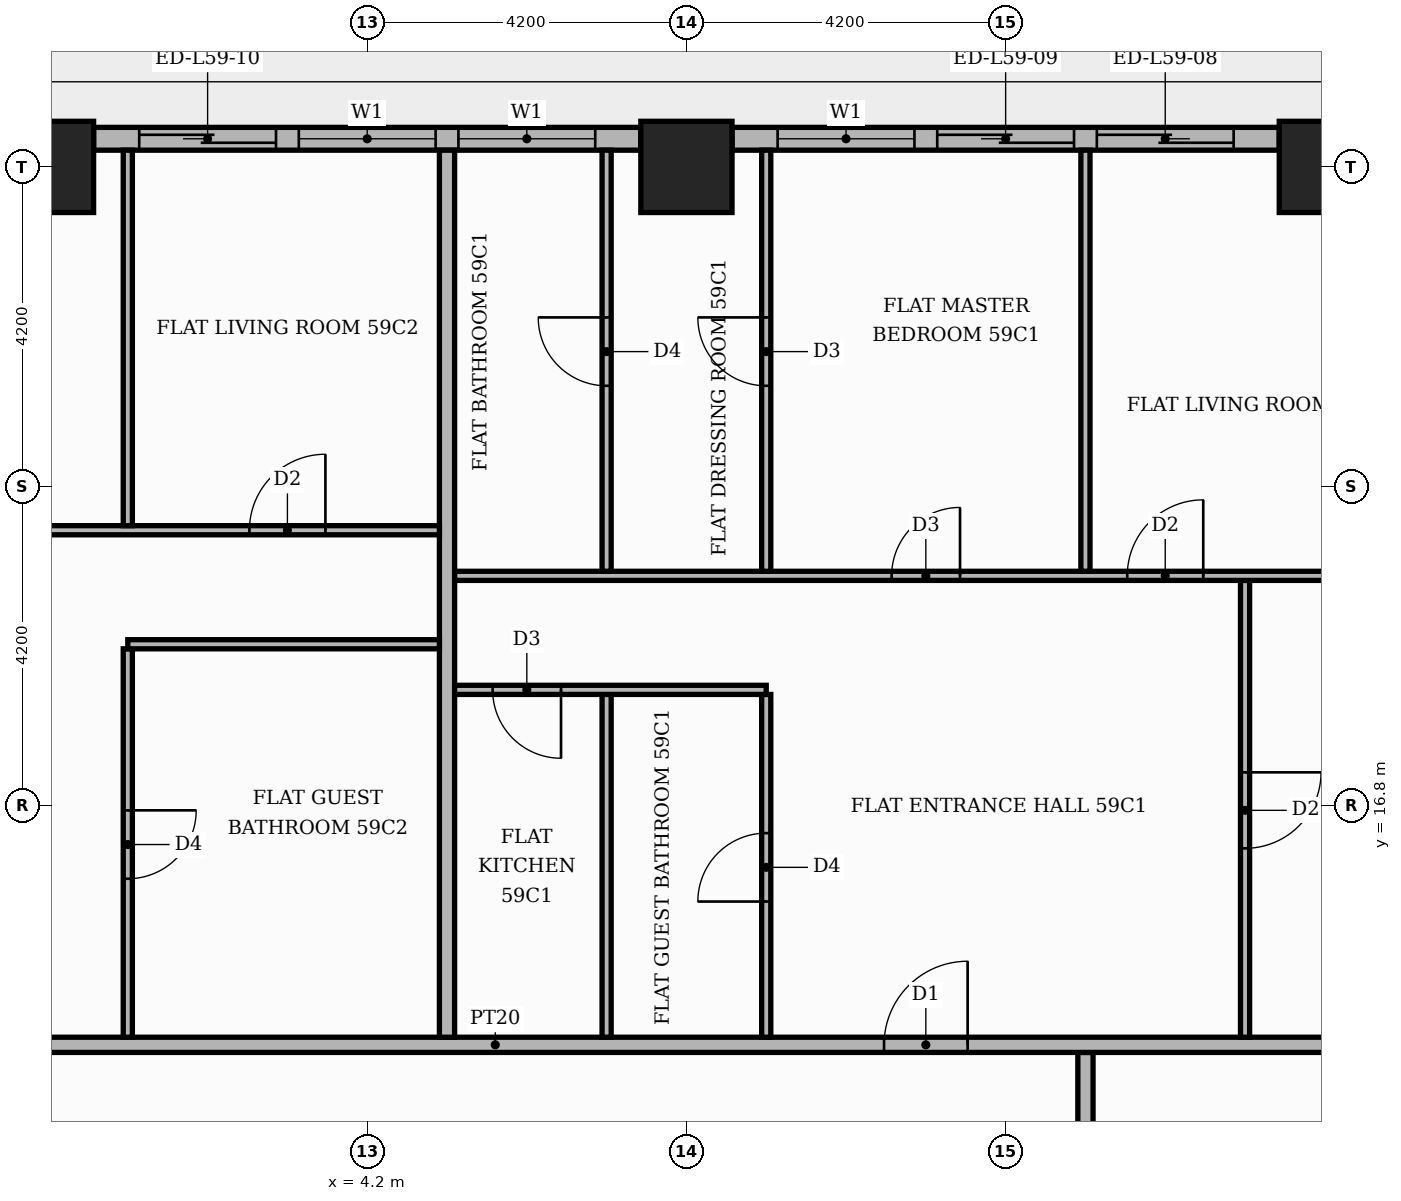
"""IFC4 building model, lengths in metres.
Left out: names, types, materials, properties, quantities, classifications, styles, units other than length and angle.
Written with IfcOpenShell. Run it as: python <this file> out.ifc"""

import sys

from ifc_helpers import new_model, si_unit, direction, frame, frame_2d, origin, origin_2d, place, context, subcontext, project, spatial, rectangle, extrude, element, fill, save


model = new_model("IFC4")
c1 = context("Model", 3, precision=1e-05, world=origin(), true_north=direction((0.0, 1.0)))
c2 = subcontext(c1, "Body", "Model", "MODEL_VIEW")
j1 = project(units=[si_unit("LENGTHUNIT", "METRE"), si_unit("PLANEANGLEUNIT", "RADIAN")], contexts=[c1])
p1 = place(None, origin())
s1 = spatial("IfcSite", under=j1, at=p1, CompositionType="ELEMENT")
p2 = place(p1, origin())
s2 = spatial("IfcBuilding", under=s1, at=p2, CompositionType="ELEMENT")
p3 = place(p2, frame((0.0, 0.0, 248.4)))
s3 = spatial("IfcBuildingStorey", under=s2, at=p3, CompositionType="ELEMENT", Elevation=248.4)
for number, where, z_axis, x_axis in (
    (1, (0.0, 25.2, 0.0), (0.0, 0.0, 1.0), (1.0, 0.0, 0.0)),
    (2, (8.4, 25.2, 0.0), (0.0, 0.0, 1.0), (1.0, 0.0, 0.0)),
    (3, (16.8, 25.2, 0.0), (0.0, 0.0, 1.0), (1.0, 0.0, 0.0)),
):
    element("IfcColumn", number, at=place(p3, frame(where, z_axis=z_axis, x_axis=x_axis)), inside=s3, PredefinedType="COLUMN", context=c2, shape_type="SweptSolid", body=[
        extrude(rectangle(XDim=1.2, YDim=1.2, at=origin_2d()), origin(), (0.0, 0.0, 1.0), 3.9),
    ])
p4 = place(p3, frame((16.2, 25.57, 0.0), z_axis=(0.0, 0.0, 1.0), x_axis=(-1.0, 0.0, 0.0)))
e4 = element("IfcWall", 4, at=p4, inside=s3, PredefinedType="STANDARD", context=c2, shape_type="SweptSolid", body=[
    extrude(rectangle(XDim=7.2, YDim=0.3, at=frame_2d((3.6, 0.0))), origin(), (0.0, 0.0, 1.0), 3.48),
])
p5 = place(p4, frame((0.6, 0.0, 0.0)))
e5 = element("IfcOpeningElement", 5, at=p5, cuts=e4, PredefinedType="OPENING", context=c2, shape_type="SweptSolid", body=[
    extrude(rectangle(XDim=1.8, YDim=2.4, at=frame_2d((0.9, 1.2))), frame((0.0, 0.16, 0.0), z_axis=(0.0, -1.0, 0.0), x_axis=(1.0, 0.0, 0.0)), (0.0, 0.0, 1.0), 0.32),
])
p6 = place(p4, frame((2.7, 0.0, 0.0)))
e6 = element("IfcOpeningElement", 6, at=p6, cuts=e4, PredefinedType="OPENING", context=c2, shape_type="SweptSolid", body=[
    extrude(rectangle(XDim=1.8, YDim=2.4, at=frame_2d((0.9, 1.2))), frame((0.0, 0.16, 0.0), z_axis=(0.0, -1.0, 0.0), x_axis=(1.0, 0.0, 0.0)), (0.0, 0.0, 1.0), 0.32),
])
p7 = place(p4, frame((4.8, 0.0, 0.9)))
e7 = element("IfcOpeningElement", 7, at=p7, cuts=e4, PredefinedType="OPENING", context=c2, shape_type="SweptSolid", body=[
    extrude(rectangle(XDim=1.8, YDim=2.1, at=frame_2d((0.9, 1.05))), frame((0.0, 0.16, 0.0), z_axis=(0.0, -1.0, 0.0), x_axis=(1.0, 0.0, 0.0)), (0.0, 0.0, 1.0), 0.32),
])
p8 = place(p3, frame((7.8, 25.57, 0.0), z_axis=(0.0, 0.0, 1.0), x_axis=(-1.0, 0.0, 0.0)))
e8 = element("IfcWall", 8, at=p8, inside=s3, PredefinedType="STANDARD", context=c2, shape_type="SweptSolid", body=[
    extrude(rectangle(XDim=7.2, YDim=0.3, at=frame_2d((3.6, 0.0))), origin(), (0.0, 0.0, 1.0), 3.48),
])
p9 = place(p8, frame((0.6, 0.0, 0.9)))
e9 = element("IfcOpeningElement", 9, at=p9, cuts=e8, PredefinedType="OPENING", context=c2, shape_type="SweptSolid", body=[
    extrude(rectangle(XDim=1.8, YDim=2.1, at=frame_2d((0.9, 1.05))), frame((0.0, 0.16, 0.0), z_axis=(0.0, -1.0, 0.0), x_axis=(1.0, 0.0, 0.0)), (0.0, 0.0, 1.0), 0.32),
])
p10 = place(p8, frame((2.7, 0.0, 0.9)))
e10 = element("IfcOpeningElement", 10, at=p10, cuts=e8, PredefinedType="OPENING", context=c2, shape_type="SweptSolid", body=[
    extrude(rectangle(XDim=1.8, YDim=2.1, at=frame_2d((0.9, 1.05))), frame((0.0, 0.16, 0.0), z_axis=(0.0, -1.0, 0.0), x_axis=(1.0, 0.0, 0.0)), (0.0, 0.0, 1.0), 0.32),
])
p11 = place(p8, frame((4.8, 0.0, 0.0)))
e11 = element("IfcOpeningElement", 11, at=p11, cuts=e8, PredefinedType="OPENING", context=c2, shape_type="SweptSolid", body=[
    extrude(rectangle(XDim=1.8, YDim=2.4, at=frame_2d((0.9, 1.2))), frame((0.0, 0.16, 0.0), z_axis=(0.0, -1.0, 0.0), x_axis=(1.0, 0.0, 0.0)), (0.0, 0.0, 1.0), 0.32),
])
p12 = place(p3, frame((13.65, 11.1, 0.0), z_axis=(0.0, 0.0, 1.0), x_axis=(0.0, 1.0, 0.0)))
e12 = element("IfcWall", 12, at=p12, inside=s3, PredefinedType="PARTITIONING", context=c2, shape_type="SweptSolid", body=[
    extrude(rectangle(XDim=2.45, YDim=0.2, at=frame_2d((1.225, 0.0))), origin(), (0.0, 0.0, 1.0), 3.48),
])
p13 = place(p3, frame((-13.65, 13.65, 0.0), z_axis=(0.0, 0.0, 1.0), x_axis=(1.0, 0.0, 0.0)))
e13 = element("IfcWall", 13, at=p13, inside=s3, PredefinedType="PARTITIONING", context=c2, shape_type="SweptSolid", body=[
    extrude(rectangle(XDim=39.07, YDim=0.2, at=frame_2d((19.535, 0.0))), origin(), (0.0, 0.0, 1.0), 3.48),
])
p14 = place(p13, frame((24.65, 0.0, 0.0)))
e14 = element("IfcOpeningElement", 14, at=p14, cuts=e13, PredefinedType="OPENING", context=c2, shape_type="SweptSolid", body=[
    extrude(rectangle(XDim=1.1, YDim=2.4, at=frame_2d((0.55, 1.2))), frame((0.0, 0.11, 0.0), z_axis=(0.0, -1.0, 0.0), x_axis=(1.0, 0.0, 0.0)), (0.0, 0.0, 1.0), 0.22),
])
p15 = place(p13, frame((12.05, 0.0, 0.0)))
e15 = element("IfcOpeningElement", 15, at=p15, cuts=e13, PredefinedType="OPENING", context=c2, shape_type="SweptSolid", body=[
    extrude(rectangle(XDim=1.1, YDim=2.4, at=frame_2d((0.55, 1.2))), frame((0.0, 0.11, 0.0), z_axis=(0.0, -1.0, 0.0), x_axis=(1.0, 0.0, 0.0)), (0.0, 0.0, 1.0), 0.22),
])
p16 = place(p3, frame((1.05, 13.75, 0.0), z_axis=(0.0, 0.0, 1.0), x_axis=(0.0, 1.0, 0.0)))
e16 = element("IfcWall", 16, at=p16, inside=s3, PredefinedType="PARTITIONING", context=c2, shape_type="SweptSolid", body=[
    extrude(rectangle(XDim=5.11, YDim=0.12, at=frame_2d((2.555, 0.0))), origin(), (0.0, 0.0, 1.0), 3.48),
])
p17 = place(p16, frame((2.085, 0.0, 0.0)))
e17 = element("IfcOpeningElement", 17, at=p17, cuts=e16, PredefinedType="OPENING", context=c2, shape_type="SweptSolid", body=[
    extrude(rectangle(XDim=0.9, YDim=2.1, at=frame_2d((0.45, 1.05))), frame((0.0, 0.07, 0.0), z_axis=(0.0, -1.0, 0.0), x_axis=(1.0, 0.0, 0.0)), (0.0, 0.0, 1.0), 0.14),
])
p18 = place(p3, frame((5.25, 13.75, 0.0), z_axis=(0.0, 0.0, 1.0), x_axis=(0.0, 1.0, 0.0)))
e18 = element("IfcWall", 18, at=p18, inside=s3, PredefinedType="PARTITIONING", context=c2, shape_type="SweptSolid", body=[
    extrude(rectangle(XDim=11.67, YDim=0.2, at=frame_2d((5.835, 0.0))), origin(), (0.0, 0.0, 1.0), 3.48),
])
p19 = place(p3, frame((7.35, 13.75, 0.0), z_axis=(0.0, 0.0, 1.0), x_axis=(0.0, 1.0, 0.0)))
e19 = element("IfcWall", 19, at=p19, inside=s3, PredefinedType="PARTITIONING", context=c2, shape_type="SweptSolid", body=[
    extrude(rectangle(XDim=4.51, YDim=0.12, at=frame_2d((2.255, 0.0))), origin(), (0.0, 0.0, 1.0), 3.48),
])
p20 = place(p3, frame((9.45, 13.75, 0.0), z_axis=(0.0, 0.0, 1.0), x_axis=(0.0, 1.0, 0.0)))
e20 = element("IfcWall", 20, at=p20, inside=s3, PredefinedType="PARTITIONING", context=c2, shape_type="SweptSolid", body=[
    extrude(rectangle(XDim=4.51, YDim=0.12, at=frame_2d((2.255, 0.0))), origin(), (0.0, 0.0, 1.0), 3.48),
])
p21 = place(p20, frame((1.785, 0.0, 0.0)))
e21 = element("IfcOpeningElement", 21, at=p21, cuts=e20, PredefinedType="OPENING", context=c2, shape_type="SweptSolid", body=[
    extrude(rectangle(XDim=0.9, YDim=2.1, at=frame_2d((0.45, 1.05))), frame((0.0, 0.07, 0.0), z_axis=(0.0, -1.0, 0.0), x_axis=(1.0, 0.0, 0.0)), (0.0, 0.0, 1.0), 0.14),
])
p22 = place(p3, frame((15.75, 13.75, 0.0), z_axis=(0.0, 0.0, 1.0), x_axis=(0.0, 1.0, 0.0)))
e22 = element("IfcWall", 22, at=p22, inside=s3, PredefinedType="PARTITIONING", context=c2, shape_type="SweptSolid", body=[
    extrude(rectangle(XDim=6.01, YDim=0.12, at=frame_2d((3.005, 0.0))), origin(), (0.0, 0.0, 1.0), 3.48),
])
p23 = place(p22, frame((2.485, 0.0, 0.0)))
e23 = element("IfcOpeningElement", 23, at=p23, cuts=e22, PredefinedType="OPENING", context=c2, shape_type="SweptSolid", body=[
    extrude(rectangle(XDim=1.0, YDim=2.1, at=frame_2d((0.5, 1.05))), frame((0.0, 0.07, 0.0), z_axis=(0.0, -1.0, 0.0), x_axis=(1.0, 0.0, 0.0)), (0.0, 0.0, 1.0), 0.14),
])
p24 = place(p3, frame((5.35, 18.32, 0.0), z_axis=(0.0, 0.0, 1.0), x_axis=(1.0, 0.0, 0.0)))
e24 = element("IfcWall", 24, at=p24, inside=s3, PredefinedType="PARTITIONING", context=c2, shape_type="SweptSolid", body=[
    extrude(rectangle(XDim=4.1, YDim=0.12, at=frame_2d((2.05, 0.0))), origin(), (0.0, 0.0, 1.0), 3.48),
])
p25 = place(p24, frame((0.5, 0.0, 0.0)))
e25 = element("IfcOpeningElement", 25, at=p25, cuts=e24, PredefinedType="OPENING", context=c2, shape_type="SweptSolid", body=[
    extrude(rectangle(XDim=0.9, YDim=2.1, at=frame_2d((0.45, 1.05))), frame((0.0, 0.07, 0.0), z_axis=(0.0, -1.0, 0.0), x_axis=(1.0, 0.0, 0.0)), (0.0, 0.0, 1.0), 0.14),
])
p26 = place(p3, frame((1.05, 18.92, 0.0), z_axis=(0.0, 0.0, 1.0), x_axis=(1.0, 0.0, 0.0)))
e26 = element("IfcWall", 26, at=p26, inside=s3, PredefinedType="PARTITIONING", context=c2, shape_type="SweptSolid", body=[
    extrude(rectangle(XDim=4.1, YDim=0.12, at=frame_2d((2.05, 0.0))), origin(), (0.0, 0.0, 1.0), 3.48),
])
p27 = place(p3, frame((5.35, 19.82, 0.0), z_axis=(0.0, 0.0, 1.0), x_axis=(1.0, 0.0, 0.0)))
e27 = element("IfcWall", 27, at=p27, inside=s3, PredefinedType="PARTITIONING", context=c2, shape_type="SweptSolid", body=[
    extrude(rectangle(XDim=12.35, YDim=0.12, at=frame_2d((6.175, 0.0))), origin(), (0.0, 0.0, 1.0), 3.48),
])
p28 = place(p27, frame((8.85, 0.0, 0.0)))
e28 = element("IfcOpeningElement", 28, at=p28, cuts=e27, PredefinedType="OPENING", context=c2, shape_type="SweptSolid", body=[
    extrude(rectangle(XDim=1.0, YDim=2.1, at=frame_2d((0.5, 1.05))), frame((0.0, 0.07, 0.0), z_axis=(0.0, -1.0, 0.0), x_axis=(1.0, 0.0, 0.0)), (0.0, 0.0, 1.0), 0.14),
])
p29 = place(p27, frame((5.75, 0.0, 0.0)))
e29 = element("IfcOpeningElement", 29, at=p29, cuts=e27, PredefinedType="OPENING", context=c2, shape_type="SweptSolid", body=[
    extrude(rectangle(XDim=0.9, YDim=2.1, at=frame_2d((0.45, 1.05))), frame((0.0, 0.07, 0.0), z_axis=(0.0, -1.0, 0.0), x_axis=(1.0, 0.0, 0.0)), (0.0, 0.0, 1.0), 0.14),
])
p30 = place(p3, frame((7.35, 19.88, 0.0), z_axis=(0.0, 0.0, 1.0), x_axis=(0.0, 1.0, 0.0)))
e30 = element("IfcWall", 30, at=p30, inside=s3, PredefinedType="PARTITIONING", context=c2, shape_type="SweptSolid", body=[
    extrude(rectangle(XDim=5.54, YDim=0.12, at=frame_2d((2.77, 0.0))), origin(), (0.0, 0.0, 1.0), 3.48),
])
p31 = place(p30, frame((2.44, 0.0, 0.0)))
e31 = element("IfcOpeningElement", 31, at=p31, cuts=e30, PredefinedType="OPENING", context=c2, shape_type="SweptSolid", body=[
    extrude(rectangle(XDim=0.9, YDim=2.1, at=frame_2d((0.45, 1.05))), frame((0.0, 0.07, 0.0), z_axis=(0.0, -1.0, 0.0), x_axis=(1.0, 0.0, 0.0)), (0.0, 0.0, 1.0), 0.14),
])
p32 = place(p3, frame((9.45, 19.88, 0.0), z_axis=(0.0, 0.0, 1.0), x_axis=(0.0, 1.0, 0.0)))
e32 = element("IfcWall", 32, at=p32, inside=s3, PredefinedType="PARTITIONING", context=c2, shape_type="SweptSolid", body=[
    extrude(rectangle(XDim=5.54, YDim=0.12, at=frame_2d((2.77, 0.0))), origin(), (0.0, 0.0, 1.0), 3.48),
])
p33 = place(p32, frame((2.44, 0.0, 0.0)))
e33 = element("IfcOpeningElement", 33, at=p33, cuts=e32, PredefinedType="OPENING", context=c2, shape_type="SweptSolid", body=[
    extrude(rectangle(XDim=0.9, YDim=2.1, at=frame_2d((0.45, 1.05))), frame((0.0, 0.07, 0.0), z_axis=(0.0, -1.0, 0.0), x_axis=(1.0, 0.0, 0.0)), (0.0, 0.0, 1.0), 0.14),
])
p34 = place(p3, frame((13.65, 19.88, 0.0), z_axis=(0.0, 0.0, 1.0), x_axis=(0.0, 1.0, 0.0)))
e34 = element("IfcWall", 34, at=p34, inside=s3, PredefinedType="PARTITIONING", context=c2, shape_type="SweptSolid", body=[
    extrude(rectangle(XDim=5.54, YDim=0.12, at=frame_2d((2.77, 0.0))), origin(), (0.0, 0.0, 1.0), 3.48),
])
p35 = place(p3, frame((-13.55, 20.42, 0.0), z_axis=(0.0, 0.0, 1.0), x_axis=(1.0, 0.0, 0.0)))
e35 = element("IfcWall", 35, at=p35, inside=s3, PredefinedType="PARTITIONING", context=c2, shape_type="SweptSolid", body=[
    extrude(rectangle(XDim=18.7, YDim=0.12, at=frame_2d((9.35, 0.0))), origin(), (0.0, 0.0, 1.0), 3.48),
])
p36 = place(p35, frame((16.2, 0.0, 0.0)))
e36 = element("IfcOpeningElement", 36, at=p36, cuts=e35, PredefinedType="OPENING", context=c2, shape_type="SweptSolid", body=[
    extrude(rectangle(XDim=1.0, YDim=2.1, at=frame_2d((0.5, 1.05))), frame((0.0, 0.07, 0.0), z_axis=(0.0, -1.0, 0.0), x_axis=(1.0, 0.0, 0.0)), (0.0, 0.0, 1.0), 0.14),
])
p37 = place(p35, frame((12.05, 0.0, 0.0)))
e37 = element("IfcOpeningElement", 37, at=p37, cuts=e35, PredefinedType="OPENING", context=c2, shape_type="SweptSolid", body=[
    extrude(rectangle(XDim=0.9, YDim=2.1, at=frame_2d((0.45, 1.05))), frame((0.0, 0.07, 0.0), z_axis=(0.0, -1.0, 0.0), x_axis=(1.0, 0.0, 0.0)), (0.0, 0.0, 1.0), 0.14),
])
p38 = place(p35, frame((3.65, 0.0, 0.0)))
e38 = element("IfcOpeningElement", 38, at=p38, cuts=e35, PredefinedType="OPENING", context=c2, shape_type="SweptSolid", body=[
    extrude(rectangle(XDim=0.9, YDim=2.1, at=frame_2d((0.45, 1.05))), frame((0.0, 0.07, 0.0), z_axis=(0.0, -1.0, 0.0), x_axis=(1.0, 0.0, 0.0)), (0.0, 0.0, 1.0), 0.14),
])
p39 = place(p3, frame((1.05, 20.48, 0.0), z_axis=(0.0, 0.0, 1.0), x_axis=(0.0, 1.0, 0.0)))
e39 = element("IfcWall", 39, at=p39, inside=s3, PredefinedType="PARTITIONING", context=c2, shape_type="SweptSolid", body=[
    extrude(rectangle(XDim=4.94, YDim=0.12, at=frame_2d((2.47, 0.0))), origin(), (0.0, 0.0, 1.0), 3.48),
])
p40 = place(p5, origin())
e40 = element("IfcDoor", 40, at=p40, inside=s3, OperationType="SLIDING_TO_LEFT", PredefinedType="DOOR", context=c2, shape_type="SweptSolid", body=[
    extrude(rectangle(XDim=1.8, YDim=2.4, at=frame_2d((0.9, 1.2))), frame((0.0, 0.025, 0.0), z_axis=(0.0, -1.0, 0.0), x_axis=(1.0, 0.0, 0.0)), (0.0, 0.0, 1.0), 0.05),
])
fill(e5, e40)
p41 = place(p6, origin())
e41 = element("IfcDoor", 41, at=p41, inside=s3, OperationType="SLIDING_TO_RIGHT", PredefinedType="DOOR", context=c2, shape_type="SweptSolid", body=[
    extrude(rectangle(XDim=1.8, YDim=2.4, at=frame_2d((0.9, 1.2))), frame((0.0, 0.025, 0.0), z_axis=(0.0, -1.0, 0.0), x_axis=(1.0, 0.0, 0.0)), (0.0, 0.0, 1.0), 0.05),
])
fill(e6, e41)
p42 = place(p7, origin())
e42 = element("IfcWindow", 42, at=p42, inside=s3, PartitioningType="SINGLE_PANEL", PredefinedType="WINDOW", context=c2, shape_type="SweptSolid", body=[
    extrude(rectangle(XDim=1.8, YDim=2.1, at=frame_2d((0.9, 1.05))), frame((0.0, 0.03, 0.0), z_axis=(0.0, -1.0, 0.0), x_axis=(1.0, 0.0, 0.0)), (0.0, 0.0, 1.0), 0.06),
])
fill(e7, e42)
p43 = place(p9, origin())
e43 = element("IfcWindow", 43, at=p43, inside=s3, PartitioningType="SINGLE_PANEL", PredefinedType="WINDOW", context=c2, shape_type="SweptSolid", body=[
    extrude(rectangle(XDim=1.8, YDim=2.1, at=frame_2d((0.9, 1.05))), frame((0.0, 0.03, 0.0), z_axis=(0.0, -1.0, 0.0), x_axis=(1.0, 0.0, 0.0)), (0.0, 0.0, 1.0), 0.06),
])
fill(e9, e43)
p44 = place(p10, origin())
e44 = element("IfcWindow", 44, at=p44, inside=s3, PartitioningType="SINGLE_PANEL", PredefinedType="WINDOW", context=c2, shape_type="SweptSolid", body=[
    extrude(rectangle(XDim=1.8, YDim=2.1, at=frame_2d((0.9, 1.05))), frame((0.0, 0.03, 0.0), z_axis=(0.0, -1.0, 0.0), x_axis=(1.0, 0.0, 0.0)), (0.0, 0.0, 1.0), 0.06),
])
fill(e10, e44)
p45 = place(p11, origin())
e45 = element("IfcDoor", 45, at=p45, inside=s3, OperationType="SLIDING_TO_RIGHT", PredefinedType="DOOR", context=c2, shape_type="SweptSolid", body=[
    extrude(rectangle(XDim=1.8, YDim=2.4, at=frame_2d((0.9, 1.2))), frame((0.0, 0.025, 0.0), z_axis=(0.0, -1.0, 0.0), x_axis=(1.0, 0.0, 0.0)), (0.0, 0.0, 1.0), 0.05),
])
fill(e11, e45)
p46 = place(p14, origin())
e46 = element("IfcDoor", 46, at=p46, inside=s3, OperationType="SINGLE_SWING_RIGHT", PredefinedType="DOOR", context=c2, shape_type="SweptSolid", body=[
    extrude(rectangle(XDim=1.1, YDim=2.4, at=frame_2d((0.55, 1.2))), frame((0.0, 0.025, 0.0), z_axis=(0.0, -1.0, 0.0), x_axis=(1.0, 0.0, 0.0)), (0.0, 0.0, 1.0), 0.05),
])
fill(e14, e46)
p47 = place(p23, frame((1.0, 0.0, 0.0), z_axis=(0.0, 0.0, 1.0), x_axis=(-1.0, 0.0, 0.0)))
e47 = element("IfcDoor", 47, at=p47, inside=s3, OperationType="SINGLE_SWING_RIGHT", PredefinedType="DOOR", context=c2, shape_type="SweptSolid", body=[
    extrude(rectangle(XDim=1.0, YDim=2.1, at=frame_2d((0.5, 1.05))), frame((0.0, 0.025, 0.0), z_axis=(0.0, -1.0, 0.0), x_axis=(1.0, 0.0, 0.0)), (0.0, 0.0, 1.0), 0.05),
])
fill(e23, e47)
p48 = place(p21, origin())
e48 = element("IfcDoor", 48, at=p48, inside=s3, OperationType="SINGLE_SWING_LEFT", PredefinedType="DOOR", context=c2, shape_type="SweptSolid", body=[
    extrude(rectangle(XDim=0.9, YDim=2.1, at=frame_2d((0.45, 1.05))), frame((0.0, 0.025, 0.0), z_axis=(0.0, -1.0, 0.0), x_axis=(1.0, 0.0, 0.0)), (0.0, 0.0, 1.0), 0.05),
])
fill(e21, e48)
p49 = place(p25, frame((0.9, 0.0, 0.0), z_axis=(0.0, 0.0, 1.0), x_axis=(-1.0, 0.0, 0.0)))
e49 = element("IfcDoor", 49, at=p49, inside=s3, OperationType="SINGLE_SWING_RIGHT", PredefinedType="DOOR", context=c2, shape_type="SweptSolid", body=[
    extrude(rectangle(XDim=0.9, YDim=2.1, at=frame_2d((0.45, 1.05))), frame((0.0, 0.025, 0.0), z_axis=(0.0, -1.0, 0.0), x_axis=(1.0, 0.0, 0.0)), (0.0, 0.0, 1.0), 0.05),
])
fill(e25, e49)
p50 = place(p28, origin())
e50 = element("IfcDoor", 50, at=p50, inside=s3, OperationType="SINGLE_SWING_RIGHT", PredefinedType="DOOR", context=c2, shape_type="SweptSolid", body=[
    extrude(rectangle(XDim=1.0, YDim=2.1, at=frame_2d((0.5, 1.05))), frame((0.0, 0.025, 0.0), z_axis=(0.0, -1.0, 0.0), x_axis=(1.0, 0.0, 0.0)), (0.0, 0.0, 1.0), 0.05),
])
fill(e28, e50)
p51 = place(p29, origin())
e51 = element("IfcDoor", 51, at=p51, inside=s3, OperationType="SINGLE_SWING_RIGHT", PredefinedType="DOOR", context=c2, shape_type="SweptSolid", body=[
    extrude(rectangle(XDim=0.9, YDim=2.1, at=frame_2d((0.45, 1.05))), frame((0.0, 0.025, 0.0), z_axis=(0.0, -1.0, 0.0), x_axis=(1.0, 0.0, 0.0)), (0.0, 0.0, 1.0), 0.05),
])
fill(e29, e51)
p52 = place(p33, origin())
e52 = element("IfcDoor", 52, at=p52, inside=s3, OperationType="SINGLE_SWING_RIGHT", PredefinedType="DOOR", context=c2, shape_type="SweptSolid", body=[
    extrude(rectangle(XDim=0.9, YDim=2.1, at=frame_2d((0.45, 1.05))), frame((0.0, 0.025, 0.0), z_axis=(0.0, -1.0, 0.0), x_axis=(1.0, 0.0, 0.0)), (0.0, 0.0, 1.0), 0.05),
])
fill(e33, e52)
p53 = place(p31, origin())
e53 = element("IfcDoor", 53, at=p53, inside=s3, OperationType="SINGLE_SWING_RIGHT", PredefinedType="DOOR", context=c2, shape_type="SweptSolid", body=[
    extrude(rectangle(XDim=0.9, YDim=2.1, at=frame_2d((0.45, 1.05))), frame((0.0, 0.025, 0.0), z_axis=(0.0, -1.0, 0.0), x_axis=(1.0, 0.0, 0.0)), (0.0, 0.0, 1.0), 0.05),
])
fill(e31, e53)
p54 = place(p17, frame((0.9, 0.0, 0.0), z_axis=(0.0, 0.0, 1.0), x_axis=(-1.0, 0.0, 0.0)))
e54 = element("IfcDoor", 54, at=p54, inside=s3, OperationType="SINGLE_SWING_RIGHT", PredefinedType="DOOR", context=c2, shape_type="SweptSolid", body=[
    extrude(rectangle(XDim=0.9, YDim=2.1, at=frame_2d((0.45, 1.05))), frame((0.0, 0.025, 0.0), z_axis=(0.0, -1.0, 0.0), x_axis=(1.0, 0.0, 0.0)), (0.0, 0.0, 1.0), 0.05),
])
fill(e17, e54)
p55 = place(p36, origin())
e55 = element("IfcDoor", 55, at=p55, inside=s3, OperationType="SINGLE_SWING_RIGHT", PredefinedType="DOOR", context=c2, shape_type="SweptSolid", body=[
    extrude(rectangle(XDim=1.0, YDim=2.1, at=frame_2d((0.5, 1.05))), frame((0.0, 0.025, 0.0), z_axis=(0.0, -1.0, 0.0), x_axis=(1.0, 0.0, 0.0)), (0.0, 0.0, 1.0), 0.05),
])
fill(e36, e55)
save(model, sys.argv[1])
